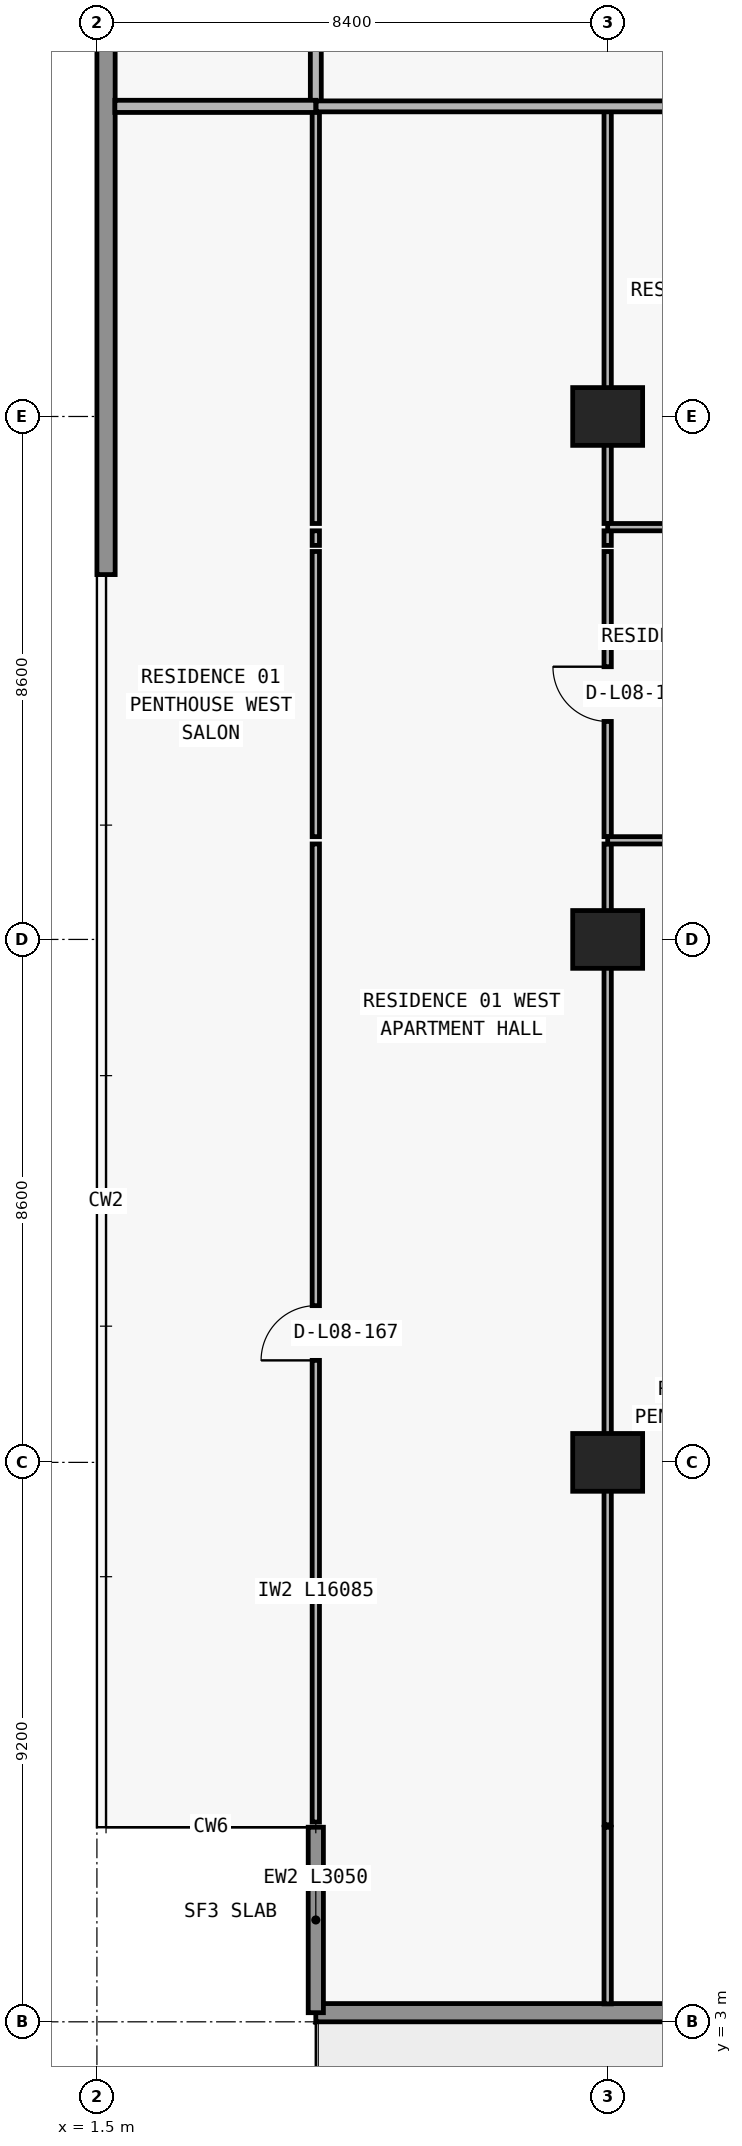
"""IFC4 building model, lengths in metres.
Left out: names, types, materials, properties, quantities, classifications, styles, units other than length and angle.
Written with IfcOpenShell. Run it as: python <this file> out.ifc"""

import sys

from ifc_helpers import new_model, si_unit, direction, frame, frame_2d, origin, origin_2d, place, context, subcontext, project, spatial, rectangle, extrude, element, fill, save


model = new_model("IFC4")
c1 = context("Model", 3, precision=1e-05, world=origin(), true_north=direction((0.0, 1.0)))
c2 = subcontext(c1, "Body", "Model", "MODEL_VIEW")
j1 = project(units=[si_unit("LENGTHUNIT", "METRE"), si_unit("PLANEANGLEUNIT", "RADIAN")], contexts=[c1])
p1 = place(None, origin())
s1 = spatial("IfcSite", under=j1, at=p1, CompositionType="ELEMENT")
p2 = place(p1, origin())
s2 = spatial("IfcBuilding", under=s1, at=p2, CompositionType="ELEMENT")
p3 = place(p2, frame((0.0, 0.0, 36.6)))
s3 = spatial("IfcBuildingStorey", under=s2, at=p3, CompositionType="ELEMENT", Elevation=36.6)
for number, where, z_axis, x_axis in (
    (1, (9.9, 12.2, 0.0), (0.0, 0.0, 1.0), (1.0, 0.0, 0.0)),
    (2, (9.9, 20.8, 0.0), (0.0, 0.0, 1.0), (1.0, 0.0, 0.0)),
    (3, (9.9, 29.4, 0.0), (0.0, 0.0, 1.0), (1.0, 0.0, 0.0)),
):
    element("IfcColumn", number, at=place(p3, frame(where, z_axis=z_axis, x_axis=x_axis)), inside=s3, PredefinedType="COLUMN", context=c2, shape_type="SweptSolid", body=[
        extrude(rectangle(XDim=1.15, YDim=0.95, at=origin_2d()), origin(), (0.0, 0.0, 1.0), 3.05),
    ])
p4 = place(p3, frame((72.7, 3.15, 0.0), z_axis=(0.0, 0.0, 1.0), x_axis=(-1.0, 0.0, 0.0)))
e4 = element("IfcWall", 4, at=p4, inside=s3, PredefinedType="STANDARD", context=c2, shape_type="SweptSolid", body=[
    extrude(rectangle(XDim=67.6, YDim=0.3, at=frame_2d((33.8, 0.0))), origin(), (0.0, 0.0, 1.0), 3.05),
])
p5 = place(p4, frame((59.826, 0.0, 0.0)))
e5 = element("IfcOpeningElement", 5, at=p5, cuts=e4, PredefinedType="OPENING", context=c2, shape_type="SweptSolid", body=[
    extrude(rectangle(XDim=2.0, YDim=2.3, at=frame_2d((1.0, 1.15))), frame((0.0, 0.16, 0.0), z_axis=(0.0, -1.0, 0.0), x_axis=(1.0, 0.0, 0.0)), (0.0, 0.0, 1.0), 0.32),
])
p6 = place(p4, frame((55.526, 0.0, 0.85)))
e6 = element("IfcOpeningElement", 6, at=p6, cuts=e4, PredefinedType="OPENING", context=c2, shape_type="SweptSolid", body=[
    extrude(rectangle(XDim=2.2, YDim=1.55, at=frame_2d((1.1, 0.775))), frame((0.0, 0.16, 0.0), z_axis=(0.0, -1.0, 0.0), x_axis=(1.0, 0.0, 0.0)), (0.0, 0.0, 1.0), 0.32),
])
p7 = place(p4, frame((51.09, 0.0, 0.0)))
e7 = element("IfcOpeningElement", 7, at=p7, cuts=e4, PredefinedType="OPENING", context=c2, shape_type="SweptSolid", body=[
    extrude(rectangle(XDim=2.0, YDim=2.3, at=frame_2d((1.0, 1.15))), frame((0.0, 0.16, 0.0), z_axis=(0.0, -1.0, 0.0), x_axis=(1.0, 0.0, 0.0)), (0.0, 0.0, 1.0), 0.32),
])
p8 = place(p4, frame((46.99, 0.0, 0.85)))
e8 = element("IfcOpeningElement", 8, at=p8, cuts=e4, PredefinedType="OPENING", context=c2, shape_type="SweptSolid", body=[
    extrude(rectangle(XDim=1.8, YDim=1.55, at=frame_2d((0.9, 0.775))), frame((0.0, 0.16, 0.0), z_axis=(0.0, -1.0, 0.0), x_axis=(1.0, 0.0, 0.0)), (0.0, 0.0, 1.0), 0.32),
])
p9 = place(p4, frame((43.026, 0.0, 0.0)))
e9 = element("IfcOpeningElement", 9, at=p9, cuts=e4, PredefinedType="OPENING", context=c2, shape_type="SweptSolid", body=[
    extrude(rectangle(XDim=2.0, YDim=2.3, at=frame_2d((1.0, 1.15))), frame((0.0, 0.16, 0.0), z_axis=(0.0, -1.0, 0.0), x_axis=(1.0, 0.0, 0.0)), (0.0, 0.0, 1.0), 0.32),
])
p10 = place(p4, frame((38.726, 0.0, 0.85)))
e10 = element("IfcOpeningElement", 10, at=p10, cuts=e4, PredefinedType="OPENING", context=c2, shape_type="SweptSolid", body=[
    extrude(rectangle(XDim=2.2, YDim=1.55, at=frame_2d((1.1, 0.775))), frame((0.0, 0.16, 0.0), z_axis=(0.0, -1.0, 0.0), x_axis=(1.0, 0.0, 0.0)), (0.0, 0.0, 1.0), 0.32),
])
p11 = place(p4, frame((34.69, 0.0, 0.0)))
e11 = element("IfcOpeningElement", 11, at=p11, cuts=e4, PredefinedType="OPENING", context=c2, shape_type="SweptSolid", body=[
    extrude(rectangle(XDim=2.0, YDim=2.3, at=frame_2d((1.0, 1.15))), frame((0.0, 0.16, 0.0), z_axis=(0.0, -1.0, 0.0), x_axis=(1.0, 0.0, 0.0)), (0.0, 0.0, 1.0), 0.32),
])
p12 = place(p4, frame((30.81, 0.0, 0.65)))
e12 = element("IfcOpeningElement", 12, at=p12, cuts=e4, PredefinedType="OPENING", context=c2, shape_type="SweptSolid", body=[
    extrude(rectangle(XDim=2.6, YDim=1.85, at=frame_2d((1.3, 0.925))), frame((0.0, 0.16, 0.0), z_axis=(0.0, -1.0, 0.0), x_axis=(1.0, 0.0, 0.0)), (0.0, 0.0, 1.0), 0.32),
])
p13 = place(p4, frame((24.7, 0.0, 0.85)))
e13 = element("IfcOpeningElement", 13, at=p13, cuts=e4, PredefinedType="OPENING", context=c2, shape_type="SweptSolid", body=[
    extrude(rectangle(XDim=2.2, YDim=1.55, at=frame_2d((1.1, 0.775))), frame((0.0, 0.16, 0.0), z_axis=(0.0, -1.0, 0.0), x_axis=(1.0, 0.0, 0.0)), (0.0, 0.0, 1.0), 0.32),
])
p14 = place(p4, frame((18.626, 0.0, 0.0)))
e14 = element("IfcOpeningElement", 14, at=p14, cuts=e4, PredefinedType="OPENING", context=c2, shape_type="SweptSolid", body=[
    extrude(rectangle(XDim=2.0, YDim=2.3, at=frame_2d((1.0, 1.15))), frame((0.0, 0.16, 0.0), z_axis=(0.0, -1.0, 0.0), x_axis=(1.0, 0.0, 0.0)), (0.0, 0.0, 1.0), 0.32),
])
p15 = place(p4, frame((14.326, 0.0, 0.85)))
e15 = element("IfcOpeningElement", 15, at=p15, cuts=e4, PredefinedType="OPENING", context=c2, shape_type="SweptSolid", body=[
    extrude(rectangle(XDim=2.2, YDim=1.55, at=frame_2d((1.1, 0.775))), frame((0.0, 0.16, 0.0), z_axis=(0.0, -1.0, 0.0), x_axis=(1.0, 0.0, 0.0)), (0.0, 0.0, 1.0), 0.32),
])
p16 = place(p4, frame((9.89, 0.0, 0.0)))
e16 = element("IfcOpeningElement", 16, at=p16, cuts=e4, PredefinedType="OPENING", context=c2, shape_type="SweptSolid", body=[
    extrude(rectangle(XDim=2.0, YDim=2.3, at=frame_2d((1.0, 1.15))), frame((0.0, 0.16, 0.0), z_axis=(0.0, -1.0, 0.0), x_axis=(1.0, 0.0, 0.0)), (0.0, 0.0, 1.0), 0.32),
])
p17 = place(p4, frame((5.79, 0.0, 0.85)))
e17 = element("IfcOpeningElement", 17, at=p17, cuts=e4, PredefinedType="OPENING", context=c2, shape_type="SweptSolid", body=[
    extrude(rectangle(XDim=1.8, YDim=1.55, at=frame_2d((0.9, 0.775))), frame((0.0, 0.16, 0.0), z_axis=(0.0, -1.0, 0.0), x_axis=(1.0, 0.0, 0.0)), (0.0, 0.0, 1.0), 0.32),
])
p18 = place(p3, frame((5.1, 6.2, 0.0), z_axis=(0.0, 0.0, 1.0), x_axis=(0.0, -1.0, 0.0)))
e18 = element("IfcWall", 18, at=p18, inside=s3, PredefinedType="ELEMENTEDWALL", context=c2, shape_type="SweptSolid", body=[
    extrude(rectangle(XDim=3.05, YDim=0.25, at=frame_2d((1.525, 0.0))), origin(), (0.0, 0.0, 1.0), 3.05),
])
p19 = place(p3, frame((1.65, 26.8, 0.0), z_axis=(0.0, 0.0, 1.0), x_axis=(0.0, 1.0, 0.0)))
e19 = element("IfcWall", 19, at=p19, inside=s3, PredefinedType="STANDARD", context=c2, shape_type="SweptSolid", body=[
    extrude(rectangle(XDim=20.6, YDim=0.3, at=frame_2d((10.3, 0.0))), origin(), (0.0, 0.0, 1.0), 3.05),
])
p20 = place(p3, frame((5.1, 6.285, 0.0), z_axis=(0.0, 0.0, 1.0), x_axis=(0.0, 1.0, 0.0)))
e20 = element("IfcWall", 20, at=p20, inside=s3, PredefinedType="PARTITIONING", context=c2, shape_type="SweptSolid", body=[
    extrude(rectangle(XDim=16.085, YDim=0.12, at=frame_2d((8.042, 0.0))), origin(), (0.0, 0.0, 1.0), 3.05),
])
p21 = place(p20, frame((7.593, 0.0, 0.0)))
e21 = element("IfcOpeningElement", 21, at=p21, cuts=e20, PredefinedType="OPENING", context=c2, shape_type="SweptSolid", body=[
    extrude(rectangle(XDim=0.9, YDim=2.15, at=frame_2d((0.45, 1.075))), frame((0.0, 0.07, 0.0), z_axis=(0.0, -1.0, 0.0), x_axis=(1.0, 0.0, 0.0)), (0.0, 0.0, 1.0), 0.14),
])
p22 = place(p3, frame((5.1, 22.49, 0.0), z_axis=(0.0, 0.0, 1.0), x_axis=(0.0, 1.0, 0.0)))
e22 = element("IfcWall", 22, at=p22, inside=s3, PredefinedType="PARTITIONING", context=c2, shape_type="SweptSolid", body=[
    extrude(rectangle(XDim=4.69, YDim=0.12, at=frame_2d((2.345, 0.0))), origin(), (0.0, 0.0, 1.0), 3.05),
])
p23 = place(p3, frame((5.1, 27.28, 0.0), z_axis=(0.0, 0.0, 1.0), x_axis=(0.0, 1.0, 0.0)))
e23 = element("IfcWall", 23, at=p23, inside=s3, PredefinedType="PARTITIONING", context=c2, shape_type="SweptSolid", body=[
    extrude(rectangle(XDim=0.24, YDim=0.12, at=frame_2d((0.12, 0.0))), origin(), (0.0, 0.0, 1.0), 3.05),
])
p24 = place(p3, frame((5.1, 27.64, 0.0), z_axis=(0.0, 0.0, 1.0), x_axis=(0.0, 1.0, 0.0)))
e24 = element("IfcWall", 24, at=p24, inside=s3, PredefinedType="PARTITIONING", context=c2, shape_type="SweptSolid", body=[
    extrude(rectangle(XDim=6.86, YDim=0.12, at=frame_2d((3.43, 0.0))), origin(), (0.0, 0.0, 1.0), 3.05),
])
p25 = place(p3, frame((5.1, 34.505, 0.0), z_axis=(0.0, 0.0, 1.0), x_axis=(0.0, 1.0, 0.0)))
e25 = element("IfcWall", 25, at=p25, inside=s3, PredefinedType="PARTITIONING", context=c2, shape_type="SweptSolid", body=[
    extrude(rectangle(XDim=2.395, YDim=0.18, at=frame_2d((1.198, 0.0))), origin(), (0.0, 0.0, 1.0), 3.05),
])
p26 = place(p3, frame((9.9, 3.295, 0.0), z_axis=(0.0, 0.0, 1.0), x_axis=(0.0, 1.0, 0.0)))
e26 = element("IfcWall", 26, at=p26, inside=s3, PredefinedType="PARTITIONING", context=c2, shape_type="SweptSolid", body=[
    extrude(rectangle(XDim=2.905, YDim=0.12, at=frame_2d((1.453, 0.0))), origin(), (0.0, 0.0, 1.0), 3.05),
])
p27 = place(p3, frame((9.9, 6.24, 0.0), z_axis=(0.0, 0.0, 1.0), x_axis=(0.0, 1.0, 0.0)))
e27 = element("IfcWall", 27, at=p27, inside=s3, PredefinedType="PARTITIONING", context=c2, shape_type="SweptSolid", body=[
    extrude(rectangle(XDim=16.13, YDim=0.12, at=frame_2d((8.065, 0.0))), origin(), (0.0, 0.0, 1.0), 2.11),
])
p28 = place(p3, frame((9.9, 22.49, 0.0), z_axis=(0.0, 0.0, 1.0), x_axis=(0.0, 1.0, 0.0)))
e28 = element("IfcWall", 28, at=p28, inside=s3, PredefinedType="PARTITIONING", context=c2, shape_type="SweptSolid", body=[
    extrude(rectangle(XDim=4.69, YDim=0.12, at=frame_2d((2.345, 0.0))), origin(), (0.0, 0.0, 1.0), 2.11),
])
p29 = place(p28, frame((1.895, 0.0, 0.0)))
e29 = element("IfcOpeningElement", 29, at=p29, cuts=e28, PredefinedType="OPENING", context=c2, shape_type="SweptSolid", body=[
    extrude(rectangle(XDim=0.9, YDim=2.06, at=frame_2d((0.45, 1.03))), frame((0.0, 0.07, 0.0), z_axis=(0.0, -1.0, 0.0), x_axis=(1.0, 0.0, 0.0)), (0.0, 0.0, 1.0), 0.14),
])
p30 = place(p3, frame((9.9, 27.28, 0.0), z_axis=(0.0, 0.0, 1.0), x_axis=(0.0, 1.0, 0.0)))
e30 = element("IfcWall", 30, at=p30, inside=s3, PredefinedType="PARTITIONING", context=c2, shape_type="SweptSolid", body=[
    extrude(rectangle(XDim=0.24, YDim=0.12, at=frame_2d((0.12, 0.0))), origin(), (0.0, 0.0, 1.0), 2.11),
])
p31 = place(p3, frame((9.9, 27.64, 0.0), z_axis=(0.0, 0.0, 1.0), x_axis=(0.0, 1.0, 0.0)))
e31 = element("IfcWall", 31, at=p31, inside=s3, PredefinedType="PARTITIONING", context=c2, shape_type="SweptSolid", body=[
    extrude(rectangle(XDim=6.86, YDim=0.12, at=frame_2d((3.43, 0.0))), origin(), (0.0, 0.0, 1.0), 2.11),
])
p32 = place(p3, frame((9.9, 22.43, 0.0), z_axis=(0.0, 0.0, 1.0), x_axis=(1.0, 0.0, 0.0)))
e32 = element("IfcWall", 32, at=p32, inside=s3, PredefinedType="PARTITIONING", context=c2, shape_type="SweptSolid", body=[
    extrude(rectangle(XDim=8.4, YDim=0.12, at=frame_2d((4.2, 0.0))), origin(), (0.0, 0.0, 1.0), 3.05),
])
p33 = place(p32, frame((1.524, 0.0, 0.0)))
e33 = element("IfcOpeningElement", 33, at=p33, cuts=e32, PredefinedType="OPENING", context=c2, shape_type="SweptSolid", body=[
    extrude(rectangle(XDim=0.9, YDim=2.15, at=frame_2d((0.45, 1.075))), frame((0.0, 0.07, 0.0), z_axis=(0.0, -1.0, 0.0), x_axis=(1.0, 0.0, 0.0)), (0.0, 0.0, 1.0), 0.14),
])
p34 = place(p32, frame((6.018, 0.0, 0.0)))
e34 = element("IfcOpeningElement", 34, at=p34, cuts=e32, PredefinedType="OPENING", context=c2, shape_type="SweptSolid", body=[
    extrude(rectangle(XDim=0.9, YDim=2.15, at=frame_2d((0.45, 1.075))), frame((0.0, 0.07, 0.0), z_axis=(0.0, -1.0, 0.0), x_axis=(1.0, 0.0, 0.0)), (0.0, 0.0, 1.0), 0.14),
])
p35 = place(p3, frame((9.9, 27.58, 0.0), z_axis=(0.0, 0.0, 1.0), x_axis=(1.0, 0.0, 0.0)))
e35 = element("IfcWall", 35, at=p35, inside=s3, PredefinedType="PARTITIONING", context=c2, shape_type="SweptSolid", body=[
    extrude(rectangle(XDim=8.4, YDim=0.12, at=frame_2d((4.2, 0.0))), origin(), (0.0, 0.0, 1.0), 3.05),
])
p36 = place(p35, frame((1.818, 0.0, 0.0)))
e36 = element("IfcOpeningElement", 36, at=p36, cuts=e35, PredefinedType="OPENING", context=c2, shape_type="SweptSolid", body=[
    extrude(rectangle(XDim=0.9, YDim=2.15, at=frame_2d((0.45, 1.075))), frame((0.0, 0.07, 0.0), z_axis=(0.0, -1.0, 0.0), x_axis=(1.0, 0.0, 0.0)), (0.0, 0.0, 1.0), 0.14),
])
p37 = place(p3, frame((1.795, 34.5, 0.0), z_axis=(0.0, 0.0, 1.0), x_axis=(1.0, 0.0, 0.0)))
e37 = element("IfcWall", 37, at=p37, inside=s3, PredefinedType="PARTITIONING", context=c2, shape_type="SweptSolid", body=[
    extrude(rectangle(XDim=3.305, YDim=0.2, at=frame_2d((1.653, 0.0))), origin(), (0.0, 0.0, 1.0), 3.05),
])
p38 = place(p3, frame((5.105, 34.5, 0.0), z_axis=(0.0, 0.0, 1.0), x_axis=(1.0, 0.0, 0.0)))
e38 = element("IfcWall", 38, at=p38, inside=s3, PredefinedType="PARTITIONING", context=c2, shape_type="SweptSolid", body=[
    extrude(rectangle(XDim=50.781, YDim=0.18, at=frame_2d((25.391, 0.0))), origin(), (0.0, 0.0, 1.0), 3.05),
])
p39 = place(p38, frame((7.67, 0.0, 0.0)))
e39 = element("IfcOpeningElement", 39, at=p39, cuts=e38, PredefinedType="OPENING", context=c2, shape_type="SweptSolid", body=[
    extrude(rectangle(XDim=1.0, YDim=2.2, at=frame_2d((0.5, 1.1))), frame((0.0, 0.1, 0.0), z_axis=(0.0, -1.0, 0.0), x_axis=(1.0, 0.0, 0.0)), (0.0, 0.0, 1.0), 0.2),
])
p40 = place(p38, frame((16.07, 0.0, 0.0)))
e40 = element("IfcOpeningElement", 40, at=p40, cuts=e38, PredefinedType="OPENING", context=c2, shape_type="SweptSolid", body=[
    extrude(rectangle(XDim=1.0, YDim=2.2, at=frame_2d((0.5, 1.1))), frame((0.0, 0.1, 0.0), z_axis=(0.0, -1.0, 0.0), x_axis=(1.0, 0.0, 0.0)), (0.0, 0.0, 1.0), 0.2),
])
p41 = place(p38, frame((24.47, 0.0, 0.0)))
e41 = element("IfcOpeningElement", 41, at=p41, cuts=e38, PredefinedType="OPENING", context=c2, shape_type="SweptSolid", body=[
    extrude(rectangle(XDim=1.0, YDim=2.2, at=frame_2d((0.5, 1.1))), frame((0.0, 0.1, 0.0), z_axis=(0.0, -1.0, 0.0), x_axis=(1.0, 0.0, 0.0)), (0.0, 0.0, 1.0), 0.2),
])
p42 = place(p38, frame((32.545, 0.0, 0.0)))
e42 = element("IfcOpeningElement", 42, at=p42, cuts=e38, PredefinedType="OPENING", context=c2, shape_type="SweptSolid", body=[
    extrude(rectangle(XDim=1.0, YDim=2.2, at=frame_2d((0.5, 1.1))), frame((0.0, 0.1, 0.0), z_axis=(0.0, -1.0, 0.0), x_axis=(1.0, 0.0, 0.0)), (0.0, 0.0, 1.0), 0.2),
])
p43 = place(p38, frame((47.888, 0.0, 0.0)))
e43 = element("IfcOpeningElement", 43, at=p43, cuts=e38, PredefinedType="OPENING", context=c2, shape_type="SweptSolid", body=[
    extrude(rectangle(XDim=1.0, YDim=2.2, at=frame_2d((0.5, 1.1))), frame((0.0, 0.1, 0.0), z_axis=(0.0, -1.0, 0.0), x_axis=(1.0, 0.0, 0.0)), (0.0, 0.0, 1.0), 0.2),
])
p44 = place(p29, origin())
e44 = element("IfcDoor", 44, at=p44, inside=s3, OperationType="SINGLE_SWING_RIGHT", PredefinedType="DOOR", context=c2, shape_type="SweptSolid", body=[
    extrude(rectangle(XDim=0.9, YDim=2.06, at=frame_2d((0.45, 1.03))), frame((0.0, 0.025, 0.0), z_axis=(0.0, -1.0, 0.0), x_axis=(1.0, 0.0, 0.0)), (0.0, 0.0, 1.0), 0.05),
])
fill(e29, e44)
p45 = place(p21, origin())
e45 = element("IfcDoor", 45, at=p45, inside=s3, OperationType="SINGLE_SWING_LEFT", PredefinedType="DOOR", context=c2, shape_type="SweptSolid", body=[
    extrude(rectangle(XDim=0.9, YDim=2.15, at=frame_2d((0.45, 1.075))), frame((0.0, 0.025, 0.0), z_axis=(0.0, -1.0, 0.0), x_axis=(1.0, 0.0, 0.0)), (0.0, 0.0, 1.0), 0.05),
])
fill(e21, e45)
save(model, sys.argv[1])
